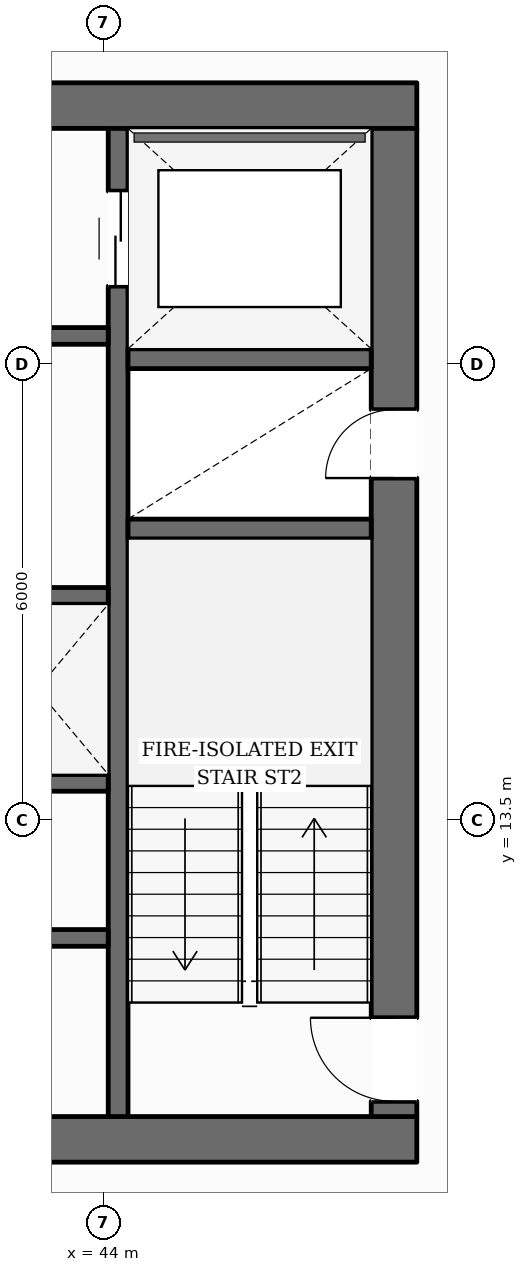
"""IFC4 building model, lengths in metres.
Left out: names, types, materials, properties, quantities, classifications, styles, units other than length and angle.
Written with IfcOpenShell. Run it as: python <this file> out.ifc"""

import sys

from ifc_helpers import new_model, si_unit, direction, frame, frame_2d, origin, place, context, subcontext, project, spatial, rectangle, extrude, element, fill, save


model = new_model("IFC4")
c1 = context("Model", 3, precision=1e-05, world=origin(), true_north=direction((0.0, 1.0)))
c2 = subcontext(c1, "Body", "Model", "MODEL_VIEW")
j1 = project(units=[si_unit("LENGTHUNIT", "METRE"), si_unit("PLANEANGLEUNIT", "RADIAN")], contexts=[c1])
p1 = place(None, origin())
s1 = spatial("IfcSite", under=j1, at=p1, CompositionType="ELEMENT")
p2 = place(p1, origin())
s2 = spatial("IfcBuilding", under=s1, at=p2, CompositionType="ELEMENT")
p3 = place(p2, frame((0.0, 0.0, 17.55)))
s3 = spatial("IfcBuildingStorey", under=s2, at=p3, CompositionType="ELEMENT", Elevation=17.55)
p4 = place(p3, frame((27.88, 9.3, 0.0), z_axis=(0.0, 0.0, 1.0), x_axis=(1.0, 0.0, 0.0)))
e1 = element("IfcWall", 1, at=p4, inside=s3, PredefinedType="SOLIDWALL", context=c2, shape_type="SweptSolid", body=[
    extrude(rectangle(XDim=20.24, YDim=0.6, at=frame_2d((10.12, 0.0))), origin(), (0.0, 0.0, 1.0), 3.59),
])
p5 = place(p4, frame((10.62, 0.0, 0.0)))
e2 = element("IfcOpeningElement", 2, at=p5, cuts=e1, PredefinedType="OPENING", context=c2, shape_type="SweptSolid", body=[
    extrude(rectangle(XDim=1.4, YDim=2.2, at=frame_2d((0.7, 1.1))), frame((0.0, 0.31, 0.0), z_axis=(0.0, -1.0, 0.0), x_axis=(1.0, 0.0, 0.0)), (0.0, 0.0, 1.0), 0.62),
])
p6 = place(p3, frame((27.88, 22.9, 0.0), z_axis=(0.0, 0.0, 1.0), x_axis=(1.0, 0.0, 0.0)))
e3 = element("IfcWall", 3, at=p6, inside=s3, PredefinedType="SOLIDWALL", context=c2, shape_type="SweptSolid", body=[
    extrude(rectangle(XDim=20.24, YDim=0.6, at=frame_2d((10.12, 0.0))), origin(), (0.0, 0.0, 1.0), 3.59),
])
p7 = place(p6, frame((6.395, 0.0, 0.0)))
e4 = element("IfcOpeningElement", 4, at=p7, cuts=e3, PredefinedType="OPENING", context=c2, shape_type="SweptSolid", body=[
    extrude(rectangle(XDim=1.05, YDim=2.15, at=frame_2d((0.525, 1.075))), frame((0.0, 0.31, 0.0), z_axis=(0.0, -1.0, 0.0), x_axis=(1.0, 0.0, 0.0)), (0.0, 0.0, 1.0), 0.62),
])
p8 = place(p6, frame((12.795, 0.0, 0.0)))
e5 = element("IfcOpeningElement", 5, at=p8, cuts=e3, PredefinedType="OPENING", context=c2, shape_type="SweptSolid", body=[
    extrude(rectangle(XDim=1.05, YDim=2.15, at=frame_2d((0.525, 1.075))), frame((0.0, 0.31, 0.0), z_axis=(0.0, -1.0, 0.0), x_axis=(1.0, 0.0, 0.0)), (0.0, 0.0, 1.0), 0.62),
])
p9 = place(p3, frame((47.82, 9.6, 0.0), z_axis=(0.0, 0.0, 1.0), x_axis=(0.0, 1.0, 0.0)))
e6 = element("IfcWall", 6, at=p9, inside=s3, PredefinedType="SOLIDWALL", context=c2, shape_type="SweptSolid", body=[
    extrude(rectangle(XDim=13.0, YDim=0.6, at=frame_2d((6.5, 0.0))), origin(), (0.0, 0.0, 1.0), 3.59),
])
p10 = place(p9, frame((0.2, 0.0, 0.0)))
e7 = element("IfcOpeningElement", 7, at=p10, cuts=e6, PredefinedType="OPENING", context=c2, shape_type="SweptSolid", body=[
    extrude(rectangle(XDim=1.1, YDim=2.15, at=frame_2d((0.55, 1.075))), frame((0.0, 0.31, 0.0), z_axis=(0.0, -1.0, 0.0), x_axis=(1.0, 0.0, 0.0)), (0.0, 0.0, 1.0), 0.62),
])
p11 = place(p9, frame((8.4, 0.0, 0.0)))
e8 = element("IfcOpeningElement", 8, at=p11, cuts=e6, PredefinedType="OPENING", context=c2, shape_type="SweptSolid", body=[
    extrude(rectangle(XDim=0.9, YDim=2.1, at=frame_2d((0.45, 1.05))), frame((0.0, 0.31, 0.0), z_axis=(0.0, -1.0, 0.0), x_axis=(1.0, 0.0, 0.0)), (0.0, 0.0, 1.0), 0.62),
])
p12 = place(p3, frame((44.19, 9.6, 0.0), z_axis=(0.0, 0.0, 1.0), x_axis=(0.0, 1.0, 0.0)))
e9 = element("IfcWall", 9, at=p12, inside=s3, PredefinedType="SHEAR", context=c2, shape_type="SweptSolid", body=[
    extrude(rectangle(XDim=13.0, YDim=0.26, at=frame_2d((6.5, 0.0))), origin(), (0.0, 0.0, 1.0), 3.59),
])
p13 = place(p12, frame((10.925, 0.0, 0.0)))
e10 = element("IfcOpeningElement", 10, at=p13, cuts=e9, PredefinedType="OPENING", context=c2, shape_type="SweptSolid", body=[
    extrude(rectangle(XDim=1.25, YDim=2.25, at=frame_2d((0.625, 1.125))), frame((0.0, 0.14, 0.0), z_axis=(0.0, -1.0, 0.0), x_axis=(1.0, 0.0, 0.0)), (0.0, 0.0, 1.0), 0.28),
])
for number, where, z_axis, x_axis in (
    (11, (44.32, 17.33, 0.0), (0.0, 0.0, 1.0), (1.0, 0.0, 0.0)),
    (12, (44.32, 19.57, 0.0), (0.0, 0.0, 1.0), (1.0, 0.0, 0.0)),
):
    element("IfcWall", number, at=place(p3, frame(where, z_axis=z_axis, x_axis=x_axis)), inside=s3, PredefinedType="SHEAR", context=c2, shape_type="SweptSolid", body=[
        extrude(rectangle(XDim=3.2, YDim=0.26, at=frame_2d((1.6, 0.0))), origin(), (0.0, 0.0, 1.0), 3.59),
    ])
p14 = place(p3, frame((31.94, 19.87, 0.0), z_axis=(0.0, 0.0, 1.0), x_axis=(1.0, 0.0, 0.0)))
e13 = element("IfcWall", 13, at=p14, inside=s3, PredefinedType="SOLIDWALL", context=c2, shape_type="SweptSolid", body=[
    extrude(rectangle(XDim=12.12, YDim=0.22, at=frame_2d((6.06, 0.0))), origin(), (0.0, 0.0, 1.0), 3.59),
])
p15 = place(p14, frame((6.3, 0.0, 0.0)))
e14 = element("IfcOpeningElement", 14, at=p15, cuts=e13, PredefinedType="OPENING", context=c2, shape_type="SweptSolid", body=[
    extrude(rectangle(XDim=1.1, YDim=2.15, at=frame_2d((0.55, 1.075))), frame((0.0, 0.12, 0.0), z_axis=(0.0, -1.0, 0.0), x_axis=(1.0, 0.0, 0.0)), (0.0, 0.0, 1.0), 0.24),
])
p16 = place(p14, frame((8.23, 0.0, 0.0)))
e15 = element("IfcOpeningElement", 15, at=p16, cuts=e13, PredefinedType="OPENING", context=c2, shape_type="SweptSolid", body=[
    extrude(rectangle(XDim=0.9, YDim=2.1, at=frame_2d((0.45, 1.05))), frame((0.0, 0.12, 0.0), z_axis=(0.0, -1.0, 0.0), x_axis=(1.0, 0.0, 0.0)), (0.0, 0.0, 1.0), 0.24),
])
p17 = place(p14, frame((10.45, 0.0, 0.0)))
e16 = element("IfcOpeningElement", 16, at=p17, cuts=e13, PredefinedType="OPENING", context=c2, shape_type="SweptSolid", body=[
    extrude(rectangle(XDim=0.9, YDim=2.1, at=frame_2d((0.45, 1.05))), frame((0.0, 0.12, 0.0), z_axis=(0.0, -1.0, 0.0), x_axis=(1.0, 0.0, 0.0)), (0.0, 0.0, 1.0), 0.24),
])
p18 = place(p3, frame((31.94, 16.45, 0.0), z_axis=(0.0, 0.0, 1.0), x_axis=(1.0, 0.0, 0.0)))
e17 = element("IfcWall", 17, at=p18, inside=s3, PredefinedType="SOLIDWALL", context=c2, shape_type="SweptSolid", body=[
    extrude(rectangle(XDim=12.12, YDim=0.22, at=frame_2d((6.06, 0.0))), origin(), (0.0, 0.0, 1.0), 3.59),
])
p19 = place(p3, frame((31.94, 13.99, 0.0), z_axis=(0.0, 0.0, 1.0), x_axis=(1.0, 0.0, 0.0)))
e18 = element("IfcWall", 18, at=p19, inside=s3, PredefinedType="SOLIDWALL", context=c2, shape_type="SweptSolid", body=[
    extrude(rectangle(XDim=12.12, YDim=0.22, at=frame_2d((6.06, 0.0))), origin(), (0.0, 0.0, 1.0), 3.59),
])
p20 = place(p19, frame((0.385, 0.0, 0.0)))
e19 = element("IfcOpeningElement", 19, at=p20, cuts=e18, PredefinedType="OPENING", context=c2, shape_type="SweptSolid", body=[
    extrude(rectangle(XDim=1.1, YDim=2.2, at=frame_2d((0.55, 1.1))), frame((0.0, 0.12, 0.0), z_axis=(0.0, -1.0, 0.0), x_axis=(1.0, 0.0, 0.0)), (0.0, 0.0, 1.0), 0.24),
])
p21 = place(p19, frame((2.435, 0.0, 0.0)))
e20 = element("IfcOpeningElement", 20, at=p21, cuts=e18, PredefinedType="OPENING", context=c2, shape_type="SweptSolid", body=[
    extrude(rectangle(XDim=1.1, YDim=2.2, at=frame_2d((0.55, 1.1))), frame((0.0, 0.12, 0.0), z_axis=(0.0, -1.0, 0.0), x_axis=(1.0, 0.0, 0.0)), (0.0, 0.0, 1.0), 0.24),
])
p22 = place(p19, frame((4.485, 0.0, 0.0)))
e21 = element("IfcOpeningElement", 21, at=p22, cuts=e18, PredefinedType="OPENING", context=c2, shape_type="SweptSolid", body=[
    extrude(rectangle(XDim=1.1, YDim=2.2, at=frame_2d((0.55, 1.1))), frame((0.0, 0.12, 0.0), z_axis=(0.0, -1.0, 0.0), x_axis=(1.0, 0.0, 0.0)), (0.0, 0.0, 1.0), 0.24),
])
p23 = place(p3, frame((40.28, 11.95, 0.0), z_axis=(0.0, 0.0, 1.0), x_axis=(1.0, 0.0, 0.0)))
e22 = element("IfcWall", 22, at=p23, inside=s3, PredefinedType="SOLIDWALL", context=c2, shape_type="SweptSolid", body=[
    extrude(rectangle(XDim=3.78, YDim=0.22, at=frame_2d((1.89, 0.0))), origin(), (0.0, 0.0, 1.0), 3.59),
])
p24 = place(p23, frame((1.55, 0.0, 0.0)))
e23 = element("IfcOpeningElement", 23, at=p24, cuts=e22, PredefinedType="OPENING", context=c2, shape_type="SweptSolid", body=[
    extrude(rectangle(XDim=0.9, YDim=2.1, at=frame_2d((0.45, 1.05))), frame((0.0, 0.12, 0.0), z_axis=(0.0, -1.0, 0.0), x_axis=(1.0, 0.0, 0.0)), (0.0, 0.0, 1.0), 0.24),
])
p25 = place(p3, frame((45.894, 44.44, 0.0), z_axis=(0.0, 0.0, 1.0), x_axis=(0.495144258579, -0.868810775253, 0.0)))
e24 = element("IfcWall", 24, at=p25, inside=s3, PredefinedType="STANDARD", context=c2, shape_type="SweptSolid", body=[
    extrude(rectangle(XDim=33.792, YDim=0.38, at=frame_2d((16.896, 0.0))), origin(), (0.0, 0.0, 1.0), 2.97),
])
p26 = place(p25, frame((24.744, 0.0, 0.0)))
e25 = element("IfcOpeningElement", 25, at=p26, cuts=e24, PredefinedType="OPENING", context=c2, shape_type="SweptSolid", body=[
    extrude(rectangle(XDim=1.0, YDim=2.2, at=frame_2d((0.5, 1.1))), frame((0.0, 0.2, 0.0), z_axis=(0.0, -1.0, 0.0), x_axis=(1.0, 0.0, 0.0)), (0.0, 0.0, 1.0), 0.4),
])
p27 = place(p25, frame((29.756, 0.0, 0.65)))
e26 = element("IfcOpeningElement", 26, at=p27, cuts=e24, PredefinedType="OPENING", context=c2, shape_type="SweptSolid", body=[
    extrude(rectangle(XDim=1.65, YDim=1.75, at=frame_2d((0.825, 0.875))), frame((0.0, 0.2, 0.0), z_axis=(0.0, -1.0, 0.0), x_axis=(1.0, 0.0, 0.0)), (0.0, 0.0, 1.0), 0.4),
])
p28 = place(p25, frame((18.81, 0.0, 0.65)))
e27 = element("IfcOpeningElement", 27, at=p28, cuts=e24, PredefinedType="OPENING", context=c2, shape_type="SweptSolid", body=[
    extrude(rectangle(XDim=1.65, YDim=1.75, at=frame_2d((0.825, 0.875))), frame((0.0, 0.2, 0.0), z_axis=(0.0, -1.0, 0.0), x_axis=(1.0, 0.0, 0.0)), (0.0, 0.0, 1.0), 0.4),
])
p29 = place(p25, frame((7.864, 0.0, 0.65)))
e28 = element("IfcOpeningElement", 28, at=p29, cuts=e24, PredefinedType="OPENING", context=c2, shape_type="SweptSolid", body=[
    extrude(rectangle(XDim=1.65, YDim=1.75, at=frame_2d((0.825, 0.875))), frame((0.0, 0.2, 0.0), z_axis=(0.0, -1.0, 0.0), x_axis=(1.0, 0.0, 0.0)), (0.0, 0.0, 1.0), 0.4),
])
p30 = place(p25, frame((2.391, 0.0, 0.65)))
e29 = element("IfcOpeningElement", 29, at=p30, cuts=e24, PredefinedType="OPENING", context=c2, shape_type="SweptSolid", body=[
    extrude(rectangle(XDim=1.65, YDim=1.75, at=frame_2d((0.825, 0.875))), frame((0.0, 0.2, 0.0), z_axis=(0.0, -1.0, 0.0), x_axis=(1.0, 0.0, 0.0)), (0.0, 0.0, 1.0), 0.4),
])
p31 = place(p10, origin())
e30 = element("IfcDoor", 30, at=p31, inside=s3, OperationType="SINGLE_SWING_RIGHT", PredefinedType="DOOR", context=c2, shape_type="SweptSolid", body=[
    extrude(rectangle(XDim=1.1, YDim=2.15, at=frame_2d((0.55, 1.075))), frame((0.0, 0.025, 0.0), z_axis=(0.0, -1.0, 0.0), x_axis=(1.0, 0.0, 0.0)), (0.0, 0.0, 1.0), 0.05),
])
fill(e7, e30)
p32 = place(p11, origin())
e31 = element("IfcDoor", 31, at=p32, inside=s3, OperationType="SINGLE_SWING_LEFT", PredefinedType="DOOR", context=c2, shape_type="SweptSolid", body=[
    extrude(rectangle(XDim=0.9, YDim=2.1, at=frame_2d((0.45, 1.05))), frame((0.0, 0.025, 0.0), z_axis=(0.0, -1.0, 0.0), x_axis=(1.0, 0.0, 0.0)), (0.0, 0.0, 1.0), 0.05),
])
fill(e8, e31)
p33 = place(p13, origin())
e32 = element("IfcDoor", 32, at=p33, inside=s3, OperationType="DOUBLE_DOOR_SLIDING", PredefinedType="DOOR", context=c2, shape_type="SweptSolid", body=[
    extrude(rectangle(XDim=1.25, YDim=2.25, at=frame_2d((0.625, 1.125))), frame((0.0, 0.025, 0.0), z_axis=(0.0, -1.0, 0.0), x_axis=(1.0, 0.0, 0.0)), (0.0, 0.0, 1.0), 0.05),
])
fill(e10, e32)
save(model, sys.argv[1])
